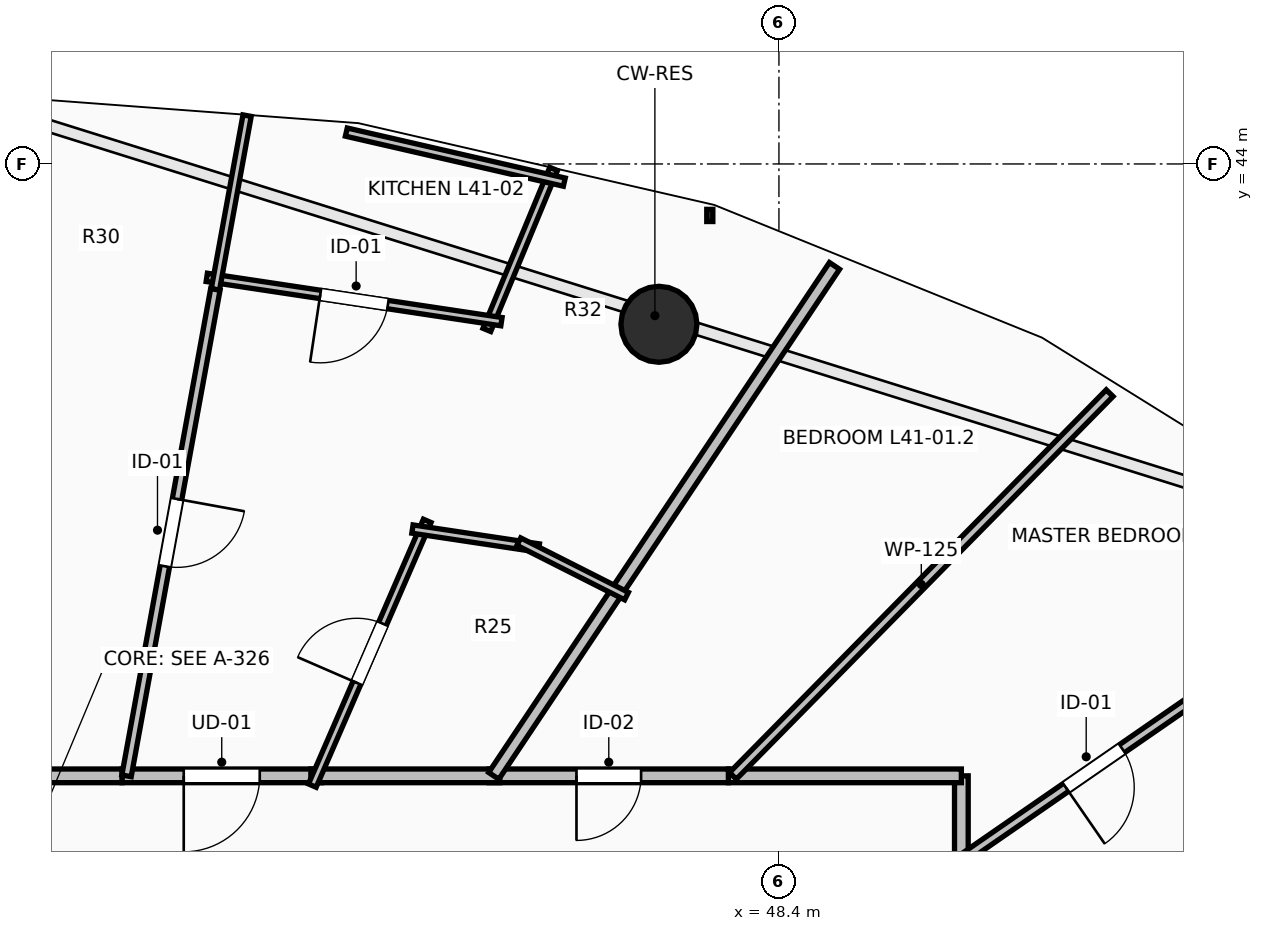
"""IFC4 building model, lengths in metres.
Left out: names, types, materials, properties, quantities, classifications, styles, units other than length and angle.
Written with IfcOpenShell. Run it as: python <this file> out.ifc"""

import sys

from ifc_helpers import new_model, si_unit, direction, frame, frame_2d, origin, origin_2d, place, context, subcontext, project, spatial, rectangle, circle, extrude, element, fill, save


model = new_model("IFC4")
c1 = context("Model", 3, precision=1e-05, world=origin(), true_north=direction((0.0, 1.0)))
c2 = subcontext(c1, "Body", "Model", "MODEL_VIEW")
j1 = project(units=[si_unit("LENGTHUNIT", "METRE"), si_unit("PLANEANGLEUNIT", "RADIAN")], contexts=[c1])
p1 = place(None, origin())
s1 = spatial("IfcSite", under=j1, at=p1, CompositionType="ELEMENT")
p2 = place(p1, origin())
s2 = spatial("IfcBuilding", under=s1, at=p2, CompositionType="ELEMENT")
p3 = place(p2, frame((0.0, 0.0, 153.6)))
s3 = spatial("IfcBuildingStorey", under=s2, at=p3, CompositionType="ELEMENT", Elevation=153.6)
p4 = place(p3, frame((46.821, 41.891, 0.0), z_axis=(0.0, 0.0, 1.0), x_axis=(0.382683432365, 0.923879532511, 0.0)))
e1 = element("IfcColumn", 1, at=p4, inside=s3, PredefinedType="COLUMN", context=c2, shape_type="SweptSolid", body=[
    extrude(circle(Radius=0.5, at=origin_2d()), origin(), (0.0, 0.0, 1.0), 3.5),
])
p5 = place(p3, frame((50.8, 34.92, 0.0), z_axis=(0.0, 0.0, 1.0), x_axis=(0.0, 1.0, 0.0)))
e2 = element("IfcWall", 2, at=p5, inside=s3, PredefinedType="PARTITIONING", context=c2, shape_type="SweptSolid", body=[
    extrude(rectangle(XDim=1.03, YDim=0.18, at=frame_2d((0.515, 0.0))), origin(), (0.0, 0.0, 1.0), 2.432),
])
p6 = place(p3, frame((50.8, 35.95, 0.0), z_axis=(0.0, 0.0, 1.0), x_axis=(-1.0, 0.0, 0.0)))
e3 = element("IfcWall", 3, at=p6, inside=s3, PredefinedType="PARTITIONING", context=c2, shape_type="SweptSolid", body=[
    extrude(rectangle(XDim=3.065, YDim=0.18, at=frame_2d((1.532, 0.0))), origin(), (0.0, 0.0, 1.0), 2.432),
])
p7 = place(p3, frame((47.735, 35.95, 0.0), z_axis=(0.0, 0.0, 1.0), x_axis=(-1.0, 0.0, 0.0)))
e4 = element("IfcWall", 4, at=p7, inside=s3, PredefinedType="PARTITIONING", context=c2, shape_type="SweptSolid", body=[
    extrude(rectangle(XDim=3.147, YDim=0.18, at=frame_2d((1.574, 0.0))), origin(), (0.0, 0.0, 1.0), 2.886),
])
p8 = place(p7, frame((1.148, 0.0, 0.0)))
e5 = element("IfcOpeningElement", 5, at=p8, cuts=e4, PredefinedType="OPENING", context=c2, shape_type="SweptSolid", body=[
    extrude(rectangle(XDim=0.85, YDim=2.1, at=frame_2d((0.425, 1.05))), frame((0.0, 0.105, 0.0), z_axis=(0.0, -1.0, 0.0), x_axis=(1.0, 0.0, 0.0)), (0.0, 0.0, 1.0), 0.21),
])
p9 = place(p3, frame((42.382, 35.95, 0.0), z_axis=(0.0, 0.0, 1.0), x_axis=(-1.0, 0.0, 0.0)))
e6 = element("IfcWall", 6, at=p9, inside=s3, PredefinedType="PARTITIONING", context=c2, shape_type="SweptSolid", body=[
    extrude(rectangle(XDim=2.625, YDim=0.18, at=frame_2d((1.312, 0.0))), origin(), (0.0, 0.0, 1.0), 2.886),
])
p10 = place(p9, frame((0.812, 0.0, 0.0)))
e7 = element("IfcOpeningElement", 7, at=p10, cuts=e6, PredefinedType="OPENING", context=c2, shape_type="SweptSolid", body=[
    extrude(rectangle(XDim=1.0, YDim=2.15, at=frame_2d((0.5, 1.075))), frame((0.0, 0.105, 0.0), z_axis=(0.0, -1.0, 0.0), x_axis=(1.0, 0.0, 0.0)), (0.0, 0.0, 1.0), 0.21),
])
p11 = place(p3, frame((44.728, 35.95, 0.0), z_axis=(0.0, 0.0, 1.0), x_axis=(-1.0, 0.0, 0.0)))
e8 = element("IfcWall", 8, at=p11, inside=s3, PredefinedType="PARTITIONING", context=c2, shape_type="SweptSolid", body=[
    extrude(rectangle(XDim=2.486, YDim=0.18, at=frame_2d((1.243, 0.0))), origin(), (0.0, 0.0, 1.0), 2.886),
])
p12 = place(p3, frame((39.757, 35.95, 0.0), z_axis=(0.0, 0.0, 1.0), x_axis=(-1.0, 0.0, 0.0)))
e9 = element("IfcWall", 9, at=p12, inside=s3, PredefinedType="PARTITIONING", context=c2, shape_type="SweptSolid", body=[
    extrude(rectangle(XDim=1.895, YDim=0.18, at=frame_2d((0.948, 0.0))), origin(), (0.0, 0.0, 1.0), 2.886),
])
p13 = place(p3, frame((54.29, 37.259, 0.0), z_axis=(0.0, 0.0, 1.0), x_axis=(-0.822672586971, -0.568515448027, 0.0)))
e10 = element("IfcWall", 10, at=p13, inside=s3, PredefinedType="PARTITIONING", context=c2, shape_type="SweptSolid", body=[
    extrude(rectangle(XDim=4.242, YDim=0.125, at=frame_2d((2.121, 0.0))), origin(), (0.0, 0.0, 1.0), 2.432),
])
p14 = place(p13, frame((1.671, 0.0, 0.0)))
e11 = element("IfcOpeningElement", 11, at=p14, cuts=e10, PredefinedType="OPENING", context=c2, shape_type="SweptSolid", body=[
    extrude(rectangle(XDim=0.9, YDim=2.1, at=frame_2d((0.45, 1.05))), frame((0.0, 0.077, 0.0), z_axis=(0.0, -1.0, 0.0), x_axis=(1.0, 0.0, 0.0)), (0.0, 0.0, 1.0), 0.155),
])
p15 = place(p3, frame((52.751, 40.985, 0.0), z_axis=(0.0, 0.0, 1.0), x_axis=(-0.701486551238, -0.712682691268, 0.0)))
e12 = element("IfcWall", 12, at=p15, inside=s3, PredefinedType="PARTITIONING", context=c2, shape_type="SweptSolid", body=[
    extrude(rectangle(XDim=7.065, YDim=0.125, at=frame_2d((3.533, 0.0))), origin(), (0.0, 0.0, 1.0), 2.432),
])
p16 = place(p3, frame((49.131, 42.659, 0.0), z_axis=(0.0, 0.0, 1.0), x_axis=(-0.555600584712, -0.831449331149, 0.0)))
e13 = element("IfcWall", 13, at=p16, inside=s3, PredefinedType="PARTITIONING", context=c2, shape_type="SweptSolid", body=[
    extrude(rectangle(XDim=8.069, YDim=0.16, at=frame_2d((4.035, 0.0))), origin(), (0.0, 0.0, 1.0), 2.432),
])
p17 = place(p3, frame((42.261, 35.822, 0.0), z_axis=(0.0, 0.0, 1.0), x_axis=(0.398098222937, 0.917342795739, 0.0)))
e14 = element("IfcWall", 14, at=p17, inside=s3, PredefinedType="PARTITIONING", context=c2, shape_type="SweptSolid", body=[
    extrude(rectangle(XDim=3.797, YDim=0.11, at=frame_2d((1.898, 0.0))), origin(), (0.0, 0.0, 1.0), 2.886),
])
p18 = place(p17, frame((1.473, 0.0, 0.0)))
e15 = element("IfcOpeningElement", 15, at=p18, cuts=e14, PredefinedType="OPENING", context=c2, shape_type="SweptSolid", body=[
    extrude(rectangle(XDim=0.85, YDim=2.1, at=frame_2d((0.425, 1.05))), frame((0.0, 0.07, 0.0), z_axis=(0.0, -1.0, 0.0), x_axis=(1.0, 0.0, 0.0)), (0.0, 0.0, 1.0), 0.14),
])
p19 = place(p3, frame((43.579, 39.197, 0.0), z_axis=(0.0, 0.0, 1.0), x_axis=(0.988928896576, -0.148390153032, 0.0)))
e16 = element("IfcWall", 16, at=p19, inside=s3, PredefinedType="PARTITIONING", context=c2, shape_type="SweptSolid", body=[
    extrude(rectangle(XDim=1.681, YDim=0.11, at=frame_2d((0.841, 0.0))), origin(), (0.0, 0.0, 1.0), 3.24),
])
p20 = place(p3, frame((44.978, 39.031, 0.0), z_axis=(0.0, 0.0, 1.0), x_axis=(0.892388427115, -0.451268096758, 0.0)))
e17 = element("IfcWall", 17, at=p20, inside=s3, PredefinedType="PARTITIONING", context=c2, shape_type="SweptSolid", body=[
    extrude(rectangle(XDim=1.588, YDim=0.11, at=frame_2d((0.794, 0.0))), origin(), (0.0, 0.0, 1.0), 2.972),
])
p21 = place(p3, frame((45.436, 43.934, 0.0), z_axis=(0.0, 0.0, 1.0), x_axis=(-0.383057133185, -0.923724652002, 0.0)))
e18 = element("IfcWall", 18, at=p21, inside=s3, PredefinedType="PARTITIONING", context=c2, shape_type="SweptSolid", body=[
    extrude(rectangle(XDim=2.292, YDim=0.11, at=frame_2d((1.146, 0.0))), origin(), (0.0, 0.0, 1.0), 2.728),
])
p22 = place(p3, frame((44.75, 41.925, 0.0), z_axis=(0.0, 0.0, 1.0), x_axis=(-0.988899781081, 0.148584060306, 0.0)))
e19 = element("IfcWall", 19, at=p22, inside=s3, PredefinedType="PARTITIONING", context=c2, shape_type="SweptSolid", body=[
    extrude(rectangle(XDim=3.92, YDim=0.11, at=frame_2d((1.96, 0.0))), origin(), (0.0, 0.0, 1.0), 3.24),
])
p23 = place(p22, frame((1.51, 0.0, 0.0)))
e20 = element("IfcOpeningElement", 20, at=p23, cuts=e19, PredefinedType="OPENING", context=c2, shape_type="SweptSolid", body=[
    extrude(rectangle(XDim=0.9, YDim=2.1, at=frame_2d((0.45, 1.05))), frame((0.0, 0.07, 0.0), z_axis=(0.0, -1.0, 0.0), x_axis=(1.0, 0.0, 0.0)), (0.0, 0.0, 1.0), 0.14),
])
p24 = place(p3, frame((40.986, 42.349, 0.0), z_axis=(0.0, 0.0, 1.0), x_axis=(0.179523238587, 0.983753732805, 0.0)))
e21 = element("IfcWall", 21, at=p24, inside=s3, PredefinedType="PARTITIONING", context=c2, shape_type="SweptSolid", body=[
    extrude(rectangle(XDim=2.324, YDim=0.11, at=frame_2d((1.162, 0.0))), origin(), (0.0, 0.0, 1.0), 2.728),
])
p25 = place(p3, frame((45.576, 43.761, 0.0), z_axis=(0.0, 0.0, 1.0), x_axis=(-0.974642290338, 0.223768643657, 0.0)))
e22 = element("IfcWall", 22, at=p25, inside=s3, PredefinedType="PARTITIONING", context=c2, shape_type="SweptSolid", body=[
    extrude(rectangle(XDim=2.943, YDim=0.11, at=frame_2d((1.471, 0.0))), origin(), (0.0, 0.0, 1.0), 3.24),
])
p26 = place(p3, frame((40.986, 42.349, 0.0), z_axis=(0.0, 0.0, 1.0), x_axis=(-0.179654893395, -0.983729698281, 0.0)))
e23 = element("IfcWall", 23, at=p26, inside=s3, PredefinedType="PARTITIONING", context=c2, shape_type="SweptSolid", body=[
    extrude(rectangle(XDim=6.505, YDim=0.125, at=frame_2d((3.253, 0.0))), origin(), (0.0, 0.0, 1.0), 2.886),
])
p27 = place(p26, frame((2.802, 0.0, 0.0)))
e24 = element("IfcOpeningElement", 24, at=p27, cuts=e23, PredefinedType="OPENING", context=c2, shape_type="SweptSolid", body=[
    extrude(rectangle(XDim=0.9, YDim=2.1, at=frame_2d((0.45, 1.05))), frame((0.0, 0.077, 0.0), z_axis=(0.0, -1.0, 0.0), x_axis=(1.0, 0.0, 0.0)), (0.0, 0.0, 1.0), 0.155),
])
p28 = place(p10, origin())
e25 = element("IfcDoor", 25, at=p28, inside=s3, OperationType="SINGLE_SWING_RIGHT", PredefinedType="DOOR", context=c2, shape_type="SweptSolid", body=[
    extrude(rectangle(XDim=1.0, YDim=2.15, at=frame_2d((0.5, 1.075))), frame((0.0, 0.025, 0.0), z_axis=(0.0, -1.0, 0.0), x_axis=(1.0, 0.0, 0.0)), (0.0, 0.0, 1.0), 0.05),
])
fill(e7, e25)
p29 = place(p14, origin())
e26 = element("IfcDoor", 26, at=p29, inside=s3, OperationType="SINGLE_SWING_RIGHT", PredefinedType="DOOR", context=c2, shape_type="SweptSolid", body=[
    extrude(rectangle(XDim=0.9, YDim=2.1, at=frame_2d((0.45, 1.05))), frame((0.0, 0.025, 0.0), z_axis=(0.0, -1.0, 0.0), x_axis=(1.0, 0.0, 0.0)), (0.0, 0.0, 1.0), 0.05),
])
fill(e11, e26)
p30 = place(p18, origin())
e27 = element("IfcDoor", 27, at=p30, inside=s3, OperationType="SINGLE_SWING_LEFT", PredefinedType="DOOR", context=c2, shape_type="SweptSolid", body=[
    extrude(rectangle(XDim=0.85, YDim=2.1, at=frame_2d((0.425, 1.05))), frame((0.0, 0.025, 0.0), z_axis=(0.0, -1.0, 0.0), x_axis=(1.0, 0.0, 0.0)), (0.0, 0.0, 1.0), 0.05),
])
fill(e15, e27)
p31 = place(p23, origin())
e28 = element("IfcDoor", 28, at=p31, inside=s3, OperationType="SINGLE_SWING_RIGHT", PredefinedType="DOOR", context=c2, shape_type="SweptSolid", body=[
    extrude(rectangle(XDim=0.9, YDim=2.1, at=frame_2d((0.45, 1.05))), frame((0.0, 0.025, 0.0), z_axis=(0.0, -1.0, 0.0), x_axis=(1.0, 0.0, 0.0)), (0.0, 0.0, 1.0), 0.05),
])
fill(e20, e28)
p32 = place(p27, origin())
e29 = element("IfcDoor", 29, at=p32, inside=s3, OperationType="SINGLE_SWING_LEFT", PredefinedType="DOOR", context=c2, shape_type="SweptSolid", body=[
    extrude(rectangle(XDim=0.9, YDim=2.1, at=frame_2d((0.45, 1.05))), frame((0.0, 0.025, 0.0), z_axis=(0.0, -1.0, 0.0), x_axis=(1.0, 0.0, 0.0)), (0.0, 0.0, 1.0), 0.05),
])
fill(e24, e29)
p33 = place(p8, origin())
e30 = element("IfcDoor", 30, at=p33, inside=s3, OperationType="SINGLE_SWING_RIGHT", PredefinedType="DOOR", context=c2, shape_type="SweptSolid", body=[
    extrude(rectangle(XDim=0.85, YDim=2.1, at=frame_2d((0.425, 1.05))), frame((0.0, 0.025, 0.0), z_axis=(0.0, -1.0, 0.0), x_axis=(1.0, 0.0, 0.0)), (0.0, 0.0, 1.0), 0.05),
])
fill(e5, e30)
save(model, sys.argv[1])
